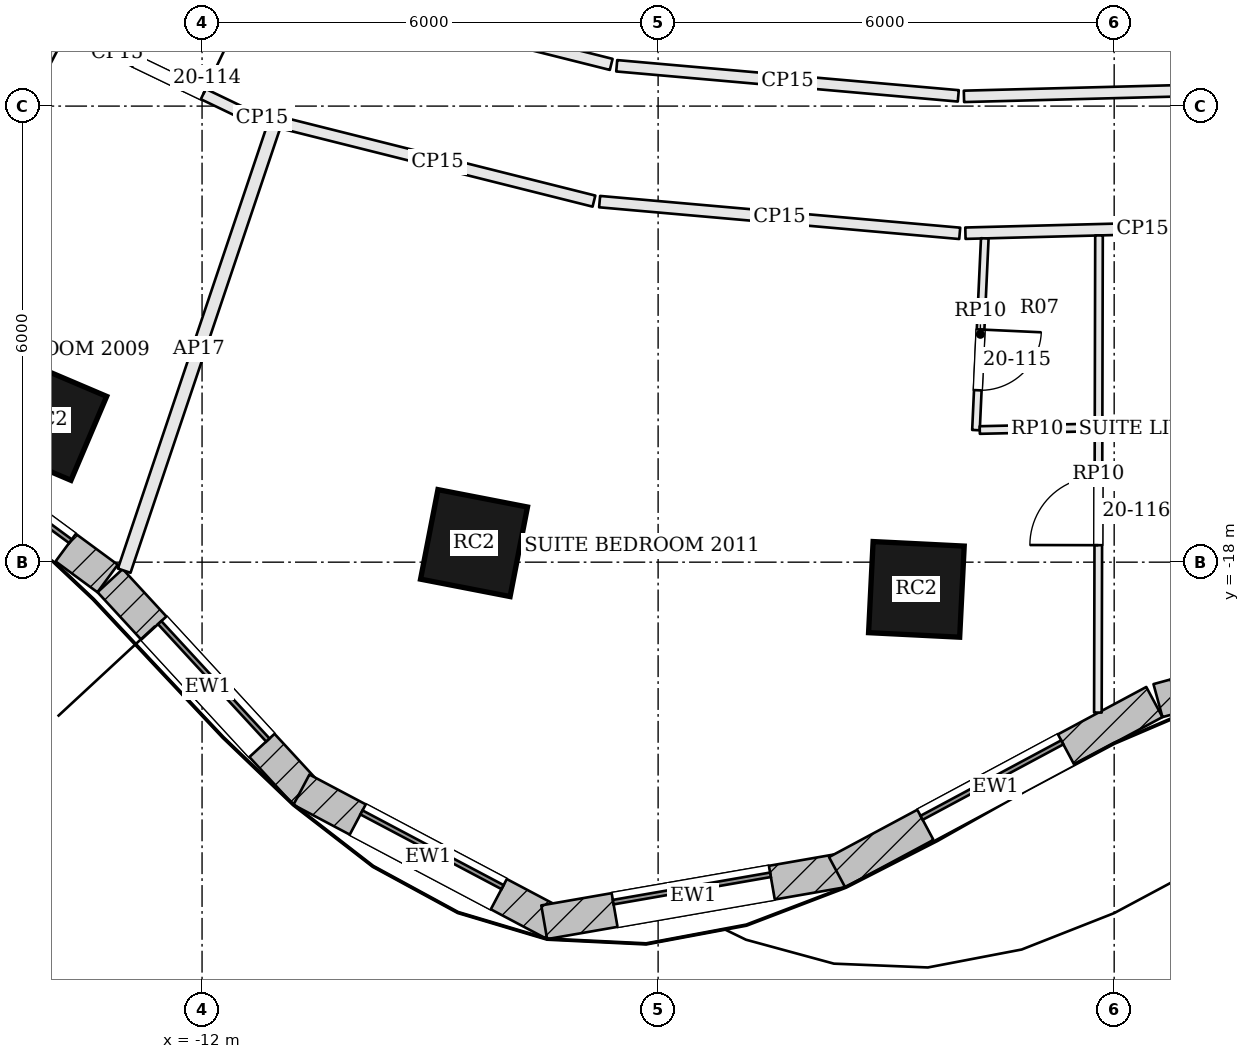
"""IFC4 building model, lengths in metres.
Left out: names, types, materials, properties, quantities, classifications, styles, units other than length and angle.
Written with IfcOpenShell. Run it as: python <this file> out.ifc"""

import sys

from ifc_helpers import new_model, si_unit, direction, frame, frame_2d, origin, origin_2d, place, context, subcontext, project, spatial, rectangle, extrude, element, fill, save


model = new_model("IFC4")
c1 = context("Model", 3, precision=1e-05, world=origin(), true_north=direction((0.0, 1.0)))
c2 = subcontext(c1, "Body", "Model", "MODEL_VIEW")
j1 = project(units=[si_unit("LENGTHUNIT", "METRE"), si_unit("PLANEANGLEUNIT", "RADIAN")], contexts=[c1])
p1 = place(None, origin())
s1 = spatial("IfcSite", under=j1, at=p1, CompositionType="ELEMENT")
p2 = place(p1, origin())
s2 = spatial("IfcBuilding", under=s1, at=p2, CompositionType="ELEMENT")
p3 = place(p2, frame((0.0, 0.0, 88.8)))
s3 = spatial("IfcBuildingStorey", under=s2, at=p3, CompositionType="ELEMENT", Elevation=88.8)
for number, where, z_axis, x_axis in (
    (1, (-14.042, -16.136, 0.0), (0.0, 0.0, 1.0), (0.92, -0.392, 0.0)),
    (2, (-8.422, -17.749, 0.0), (0.0, 0.0, 1.0), (0.982, -0.191, 0.0)),
    (3, (-2.602, -18.358, 0.0), (0.0, 0.0, 1.0), (0.999, -0.05, 0.0)),
):
    element("IfcColumn", number, at=place(p3, frame(where, z_axis=z_axis, x_axis=x_axis)), inside=s3, PredefinedType="COLUMN", context=c2, shape_type="SweptSolid", body=[
        extrude(rectangle(XDim=1.2, YDim=1.2, at=origin_2d()), origin(), (0.0, 0.0, 1.0), 3.6),
    ])
p4 = place(p3, frame((-16.036, -16.158, 0.0), z_axis=(0.0, 0.0, 1.0), x_axis=(0.805181432967, -0.593028549064, 0.0)))
e4 = element("IfcWall", 4, at=p4, inside=s3, PredefinedType="SOLIDWALL", context=c2, shape_type="SweptSolid", body=[
    extrude(rectangle(XDim=3.469, YDim=0.45, at=frame_2d((1.734, 0.0))), origin(), (0.0, 0.0, 1.0), 3.4),
])
p5 = place(p4, frame((0.684, 0.0, 0.9)))
e5 = element("IfcOpeningElement", 5, at=p5, cuts=e4, PredefinedType="OPENING", context=c2, shape_type="SweptSolid", body=[
    extrude(rectangle(XDim=2.1, YDim=2.0, at=frame_2d((1.05, 1.0))), frame((0.0, 0.235, 0.0), z_axis=(0.0, -1.0, 0.0), x_axis=(1.0, 0.0, 0.0)), (0.0, 0.0, 1.0), 0.47),
])
p6 = place(p3, frame((-13.209, -18.243, 0.0), z_axis=(0.0, 0.0, 1.0), x_axis=(0.677612152497, -0.735419452278, 0.0)))
e6 = element("IfcWall", 6, at=p6, inside=s3, PredefinedType="SOLIDWALL", context=c2, shape_type="SweptSolid", body=[
    extrude(rectangle(XDim=3.797, YDim=0.45, at=frame_2d((1.898, 0.0))), origin(), (0.0, 0.0, 1.0), 3.4),
])
p7 = place(p6, frame((0.848, 0.0, 0.9)))
e7 = element("IfcOpeningElement", 7, at=p7, cuts=e6, PredefinedType="OPENING", context=c2, shape_type="SweptSolid", body=[
    extrude(rectangle(XDim=2.1, YDim=2.0, at=frame_2d((1.05, 1.0))), frame((0.0, 0.235, 0.0), z_axis=(0.0, -1.0, 0.0), x_axis=(1.0, 0.0, 0.0)), (0.0, 0.0, 1.0), 0.47),
])
p8 = place(p3, frame((-10.693, -20.993, 0.0), z_axis=(0.0, 0.0, 1.0), x_axis=(0.883817790726, -0.46783128668, 0.0)))
e8 = element("IfcWall", 8, at=p8, inside=s3, PredefinedType="SOLIDWALL", context=c2, shape_type="SweptSolid", body=[
    extrude(rectangle(XDim=3.777, YDim=0.45, at=frame_2d((1.888, 0.0))), origin(), (0.0, 0.0, 1.0), 3.4),
])
p9 = place(p8, frame((0.838, 0.0, 0.9)))
e9 = element("IfcOpeningElement", 9, at=p9, cuts=e8, PredefinedType="OPENING", context=c2, shape_type="SweptSolid", body=[
    extrude(rectangle(XDim=2.1, YDim=2.0, at=frame_2d((1.05, 1.0))), frame((0.0, 0.235, 0.0), z_axis=(0.0, -1.0, 0.0), x_axis=(1.0, 0.0, 0.0)), (0.0, 0.0, 1.0), 0.47),
])
p10 = place(p3, frame((-7.499, -22.737, 0.0), z_axis=(0.0, 0.0, 1.0), x_axis=(0.98521220506, 0.171338585849, 0.0)))
e10 = element("IfcWall", 10, at=p10, inside=s3, PredefinedType="SOLIDWALL", context=c2, shape_type="SweptSolid", body=[
    extrude(rectangle(XDim=3.98, YDim=0.45, at=frame_2d((1.99, 0.0))), origin(), (0.0, 0.0, 1.0), 3.4),
])
p11 = place(p10, frame((0.94, 0.0, 0.9)))
e11 = element("IfcOpeningElement", 11, at=p11, cuts=e10, PredefinedType="OPENING", context=c2, shape_type="SweptSolid", body=[
    extrude(rectangle(XDim=2.1, YDim=2.0, at=frame_2d((1.05, 1.0))), frame((0.0, 0.235, 0.0), z_axis=(0.0, -1.0, 0.0), x_axis=(1.0, 0.0, 0.0)), (0.0, 0.0, 1.0), 0.47),
])
p12 = place(p3, frame((-3.646, -22.079, 0.0), z_axis=(0.0, 0.0, 1.0), x_axis=(0.881279133897, 0.472596115259, 0.0)))
e12 = element("IfcWall", 12, at=p12, inside=s3, PredefinedType="SOLIDWALL", context=c2, shape_type="SweptSolid", body=[
    extrude(rectangle(XDim=4.737, YDim=0.45, at=frame_2d((2.368, 0.0))), origin(), (0.0, 0.0, 1.0), 3.4),
])
p13 = place(p12, frame((1.318, 0.0, 0.9)))
e13 = element("IfcOpeningElement", 13, at=p13, cuts=e12, PredefinedType="OPENING", context=c2, shape_type="SweptSolid", body=[
    extrude(rectangle(XDim=2.1, YDim=2.0, at=frame_2d((1.05, 1.0))), frame((0.0, 0.235, 0.0), z_axis=(0.0, -1.0, 0.0), x_axis=(1.0, 0.0, 0.0)), (0.0, 0.0, 1.0), 0.47),
])
p14 = place(p3, frame((0.576, -19.821, 0.0), z_axis=(0.0, 0.0, 1.0), x_axis=(0.965009398019, 0.262215296532, 0.0)))
e14 = element("IfcWall", 14, at=p14, inside=s3, PredefinedType="SOLIDWALL", context=c2, shape_type="SweptSolid", body=[
    extrude(rectangle(XDim=2.565, YDim=0.45, at=frame_2d((1.283, 0.0))), origin(), (0.0, 0.0, 1.0), 3.4),
])
p15 = place(p14, frame((0.233, 0.0, 0.9)))
e15 = element("IfcOpeningElement", 15, at=p15, cuts=e14, PredefinedType="OPENING", context=c2, shape_type="SweptSolid", body=[
    extrude(rectangle(XDim=2.1, YDim=2.0, at=frame_2d((1.05, 1.0))), frame((0.0, 0.235, 0.0), z_axis=(0.0, -1.0, 0.0), x_axis=(1.0, 0.0, 0.0)), (0.0, 0.0, 1.0), 0.47),
])
p16 = place(p3, frame((-14.771, -10.503, 0.0), z_axis=(0.0, 0.0, 1.0), x_axis=(0.901503349553, -0.432772123346, 0.0)))
e16 = element("IfcWall", 16, at=p16, inside=s3, PredefinedType="PARTITIONING", context=c2, shape_type="SweptSolid", body=[
    extrude(rectangle(XDim=3.673, YDim=0.15, at=frame_2d((1.836, 0.0))), origin(), (0.0, 0.0, 1.0), 2.784),
])
p17 = place(p16, frame((2.092, 0.0, 0.0)))
e17 = element("IfcOpeningElement", 17, at=p17, cuts=e16, PredefinedType="OPENING", context=c2, shape_type="SweptSolid", body=[
    extrude(rectangle(XDim=1.0, YDim=2.1, at=frame_2d((0.5, 1.05))), frame((0.0, 0.085, 0.0), z_axis=(0.0, -1.0, 0.0), x_axis=(1.0, 0.0, 0.0)), (0.0, 0.0, 1.0), 0.17),
])
p18 = place(p3, frame((-11.387, -12.111, 0.0), z_axis=(0.0, 0.0, 1.0), x_axis=(0.969945028314, -0.243324150157, 0.0)))
e18 = element("IfcWall", 18, at=p18, inside=s3, PredefinedType="PARTITIONING", context=c2, shape_type="SweptSolid", body=[
    extrude(rectangle(XDim=0.364, YDim=0.15, at=frame_2d((0.182, 0.0))), origin(), (0.0, 0.0, 1.0), 2.784),
])
p19 = place(p3, frame((-13.024, -18.112, 0.0), z_axis=(0.0, 0.0, 1.0), x_axis=(0.319078434674, 0.947728311556, 0.0)))
e19 = element("IfcWall", 19, at=p19, inside=s3, PredefinedType="PARTITIONING", context=c2, shape_type="SweptSolid", body=[
    extrude(rectangle(XDim=6.163, YDim=0.175, at=frame_2d((3.082, 0.0))), origin(), (0.0, 0.0, 1.0), 2.784),
])
p20 = place(p3, frame((-10.961, -12.218, 0.0), z_axis=(0.0, 0.0, 1.0), x_axis=(0.969990045386, -0.243144631551, 0.0)))
e20 = element("IfcWall", 20, at=p20, inside=s3, PredefinedType="PARTITIONING", context=c2, shape_type="SweptSolid", body=[
    extrude(rectangle(XDim=4.244, YDim=0.15, at=frame_2d((2.122, 0.0))), origin(), (0.0, 0.0, 1.0), 2.784),
])
p21 = place(p3, frame((-6.77, -13.257, 0.0), z_axis=(0.0, 0.0, 1.0), x_axis=(0.996139758015, -0.08778144737, 0.0)))
e21 = element("IfcWall", 21, at=p21, inside=s3, PredefinedType="PARTITIONING", context=c2, shape_type="SweptSolid", body=[
    extrude(rectangle(XDim=4.756, YDim=0.15, at=frame_2d((2.378, 0.0))), origin(), (0.0, 0.0, 1.0), 2.784),
])
p22 = place(p3, frame((-1.957, -13.672, 0.0), z_axis=(0.0, 0.0, 1.0), x_axis=(0.999664413823, 0.025904820691, 0.0)))
e22 = element("IfcWall", 22, at=p22, inside=s3, PredefinedType="PARTITIONING", context=c2, shape_type="SweptSolid", body=[
    extrude(rectangle(XDim=4.665, YDim=0.15, at=frame_2d((2.333, 0.0))), origin(), (0.0, 0.0, 1.0), 2.784),
])
p23 = place(p22, frame((2.712, 0.0, 0.0)))
e23 = element("IfcOpeningElement", 23, at=p23, cuts=e22, PredefinedType="OPENING", context=c2, shape_type="SweptSolid", body=[
    extrude(rectangle(XDim=1.0, YDim=2.1, at=frame_2d((0.5, 1.05))), frame((0.0, 0.085, 0.0), z_axis=(0.0, -1.0, 0.0), x_axis=(1.0, 0.0, 0.0)), (0.0, 0.0, 1.0), 0.17),
])
p24 = place(p3, frame((4.684, -11.699, 0.0), z_axis=(0.0, 0.0, 1.0), x_axis=(-0.999663438204, -0.025942442425, 0.0)))
e24 = element("IfcWall", 24, at=p24, inside=s3, PredefinedType="PARTITIONING", context=c2, shape_type="SweptSolid", body=[
    extrude(rectangle(XDim=6.663, YDim=0.15, at=frame_2d((3.332, 0.0))), origin(), (0.0, 0.0, 1.0), 2.784),
])
p25 = place(p3, frame((-2.051, -11.865, 0.0), z_axis=(0.0, 0.0, 1.0), x_axis=(-0.996139599493, 0.087783246245, 0.0)))
e25 = element("IfcWall", 25, at=p25, inside=s3, PredefinedType="PARTITIONING", context=c2, shape_type="SweptSolid", body=[
    extrude(rectangle(XDim=4.511, YDim=0.15, at=frame_2d((2.255, 0.0))), origin(), (0.0, 0.0, 1.0), 2.784),
])
p26 = place(p3, frame((-6.617, -11.451, 0.0), z_axis=(0.0, 0.0, 1.0), x_axis=(-0.969987441267, 0.243155020069, 0.0)))
e26 = element("IfcWall", 26, at=p26, inside=s3, PredefinedType="PARTITIONING", context=c2, shape_type="SweptSolid", body=[
    extrude(rectangle(XDim=4.359, YDim=0.15, at=frame_2d((2.179, 0.0))), origin(), (0.0, 0.0, 1.0), 2.784),
])
p27 = place(p3, frame((-16.341, -15.862, 0.0), z_axis=(0.0, 0.0, 1.0), x_axis=(0.460149427678, 0.887841485969, 0.0)))
e27 = element("IfcWall", 27, at=p27, inside=s3, PredefinedType="PARTITIONING", context=c2, shape_type="SweptSolid", body=[
    extrude(rectangle(XDim=5.438, YDim=0.1, at=frame_2d((2.719, 0.0))), origin(), (0.0, 0.0, 1.0), 2.884),
])
p28 = place(p27, frame((1.363, 0.0, 0.0)))
e28 = element("IfcOpeningElement", 28, at=p28, cuts=e27, PredefinedType="OPENING", context=c2, shape_type="SweptSolid", body=[
    extrude(rectangle(XDim=0.9, YDim=2.4, at=frame_2d((0.45, 1.2))), frame((0.0, 0.06, 0.0), z_axis=(0.0, -1.0, 0.0), x_axis=(1.0, 0.0, 0.0)), (0.0, 0.0, 1.0), 0.12),
])
p29 = place(p3, frame((-0.214, -19.979, 0.0), z_axis=(0.0, 0.0, 1.0), x_axis=(0.002333625165, 0.999997277093, 0.0)))
e29 = element("IfcWall", 29, at=p29, inside=s3, PredefinedType="PARTITIONING", context=c2, shape_type="SweptSolid", body=[
    extrude(rectangle(XDim=6.277, YDim=0.1, at=frame_2d((3.139, 0.0))), origin(), (0.0, 0.0, 1.0), 2.884),
])
p30 = place(p29, frame((2.202, 0.0, 0.0)))
e30 = element("IfcOpeningElement", 30, at=p30, cuts=e29, PredefinedType="OPENING", context=c2, shape_type="SweptSolid", body=[
    extrude(rectangle(XDim=0.9, YDim=2.4, at=frame_2d((0.45, 1.2))), frame((0.0, 0.06, 0.0), z_axis=(0.0, -1.0, 0.0), x_axis=(1.0, 0.0, 0.0)), (0.0, 0.0, 1.0), 0.12),
])
p31 = place(p3, frame((-1.702, -13.74, 0.0), z_axis=(0.0, 0.0, 1.0), x_axis=(-0.045833111847, -0.998949110745, 0.0)))
e31 = element("IfcWall", 31, at=p31, inside=s3, PredefinedType="PARTITIONING", context=c2, shape_type="SweptSolid", body=[
    extrude(rectangle(XDim=2.525, YDim=0.1, at=frame_2d((1.262, 0.0))), origin(), (0.0, 0.0, 1.0), 2.884),
])
p32 = place(p31, frame((1.2, 0.0, 0.0)))
e32 = element("IfcOpeningElement", 32, at=p32, cuts=e31, PredefinedType="OPENING", context=c2, shape_type="SweptSolid", body=[
    extrude(rectangle(XDim=0.8, YDim=2.1, at=frame_2d((0.4, 1.05))), frame((0.0, 0.06, 0.0), z_axis=(0.0, -1.0, 0.0), x_axis=(1.0, 0.0, 0.0)), (0.0, 0.0, 1.0), 0.12),
])
p33 = place(p3, frame((-1.768, -16.262, 0.0), z_axis=(0.0, 0.0, 1.0), x_axis=(0.999748456617, 0.022428185195, 0.0)))
e33 = element("IfcWall", 33, at=p33, inside=s3, PredefinedType="PARTITIONING", context=c2, shape_type="SweptSolid", body=[
    extrude(rectangle(XDim=1.513, YDim=0.1, at=frame_2d((0.757, 0.0))), origin(), (0.0, 0.0, 1.0), 2.884),
])
p34 = place(p5, origin())
e34 = element("IfcWindow", 34, at=p34, inside=s3, PartitioningType="SINGLE_PANEL", PredefinedType="WINDOW", context=c2, shape_type="SweptSolid", body=[
    extrude(rectangle(XDim=2.1, YDim=2.0, at=frame_2d((1.05, 1.0))), frame((0.0, 0.135, 0.0), z_axis=(0.0, -1.0, 0.0), x_axis=(1.0, 0.0, 0.0)), (0.0, 0.0, 1.0), 0.06),
])
fill(e5, e34)
p35 = place(p7, origin())
e35 = element("IfcWindow", 35, at=p35, inside=s3, PartitioningType="SINGLE_PANEL", PredefinedType="WINDOW", context=c2, shape_type="SweptSolid", body=[
    extrude(rectangle(XDim=2.1, YDim=2.0, at=frame_2d((1.05, 1.0))), frame((0.0, 0.135, 0.0), z_axis=(0.0, -1.0, 0.0), x_axis=(1.0, 0.0, 0.0)), (0.0, 0.0, 1.0), 0.06),
])
fill(e7, e35)
p36 = place(p9, origin())
e36 = element("IfcWindow", 36, at=p36, inside=s3, PartitioningType="SINGLE_PANEL", PredefinedType="WINDOW", context=c2, shape_type="SweptSolid", body=[
    extrude(rectangle(XDim=2.1, YDim=2.0, at=frame_2d((1.05, 1.0))), frame((0.0, 0.135, 0.0), z_axis=(0.0, -1.0, 0.0), x_axis=(1.0, 0.0, 0.0)), (0.0, 0.0, 1.0), 0.06),
])
fill(e9, e36)
p37 = place(p11, origin())
e37 = element("IfcWindow", 37, at=p37, inside=s3, PartitioningType="SINGLE_PANEL", PredefinedType="WINDOW", context=c2, shape_type="SweptSolid", body=[
    extrude(rectangle(XDim=2.1, YDim=2.0, at=frame_2d((1.05, 1.0))), frame((0.0, 0.135, 0.0), z_axis=(0.0, -1.0, 0.0), x_axis=(1.0, 0.0, 0.0)), (0.0, 0.0, 1.0), 0.06),
])
fill(e11, e37)
p38 = place(p13, origin())
e38 = element("IfcWindow", 38, at=p38, inside=s3, PartitioningType="SINGLE_PANEL", PredefinedType="WINDOW", context=c2, shape_type="SweptSolid", body=[
    extrude(rectangle(XDim=2.1, YDim=2.0, at=frame_2d((1.05, 1.0))), frame((0.0, 0.135, 0.0), z_axis=(0.0, -1.0, 0.0), x_axis=(1.0, 0.0, 0.0)), (0.0, 0.0, 1.0), 0.06),
])
fill(e13, e38)
p39 = place(p17, origin())
e39 = element("IfcDoor", 39, at=p39, inside=s3, OperationType="SINGLE_SWING_RIGHT", PredefinedType="DOOR", context=c2, shape_type="SweptSolid", body=[
    extrude(rectangle(XDim=1.0, YDim=2.1, at=frame_2d((0.5, 1.05))), frame((0.0, 0.025, 0.0), z_axis=(0.0, -1.0, 0.0), x_axis=(1.0, 0.0, 0.0)), (0.0, 0.0, 1.0), 0.05),
])
fill(e17, e39)
p40 = place(p32, origin())
e40 = element("IfcDoor", 40, at=p40, inside=s3, OperationType="SINGLE_SWING_LEFT", PredefinedType="DOOR", context=c2, shape_type="SweptSolid", body=[
    extrude(rectangle(XDim=0.8, YDim=2.1, at=frame_2d((0.4, 1.05))), frame((0.0, 0.025, 0.0), z_axis=(0.0, -1.0, 0.0), x_axis=(1.0, 0.0, 0.0)), (0.0, 0.0, 1.0), 0.05),
])
fill(e32, e40)
p41 = place(p30, origin())
e41 = element("IfcDoor", 41, at=p41, inside=s3, OperationType="SINGLE_SWING_LEFT", PredefinedType="DOOR", context=c2, shape_type="SweptSolid", body=[
    extrude(rectangle(XDim=0.9, YDim=2.4, at=frame_2d((0.45, 1.2))), frame((0.0, 0.025, 0.0), z_axis=(0.0, -1.0, 0.0), x_axis=(1.0, 0.0, 0.0)), (0.0, 0.0, 1.0), 0.05),
])
fill(e30, e41)
save(model, sys.argv[1])
